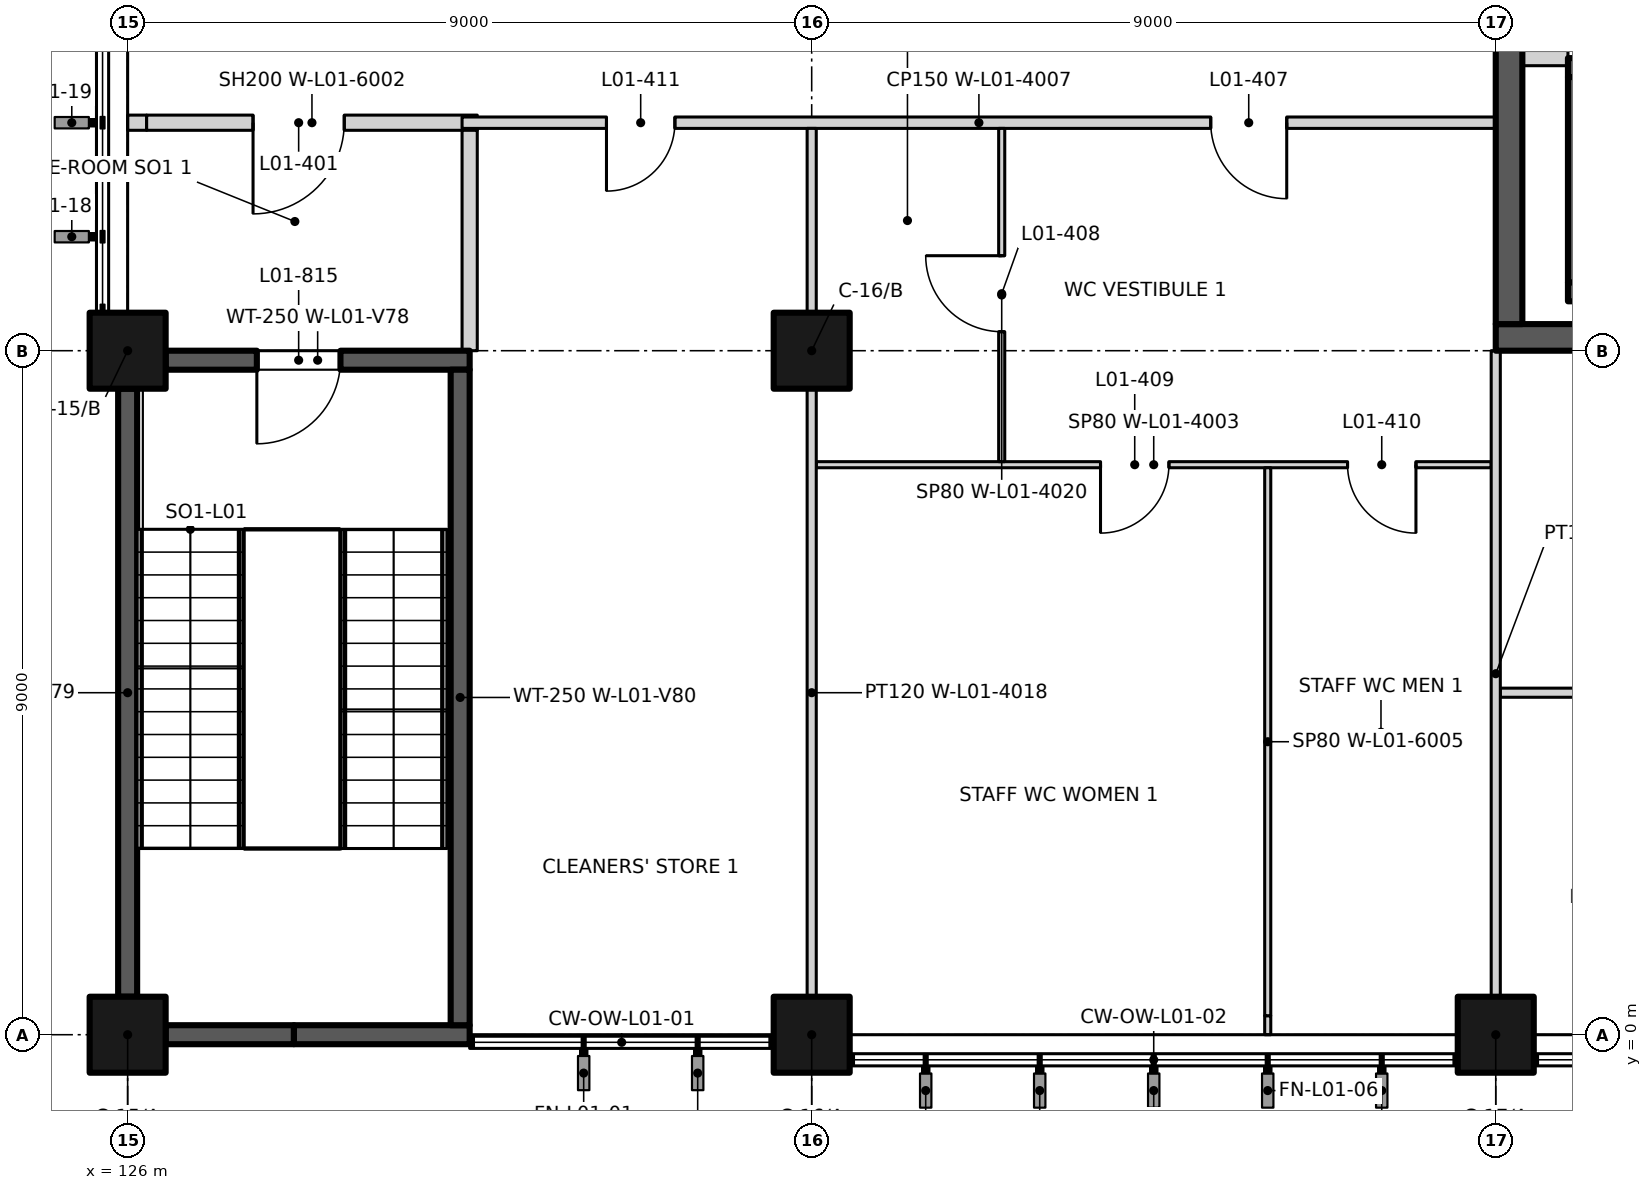
"""IFC4 building model, lengths in metres.
Left out: names, types, materials, properties, quantities, classifications, styles, units other than length and angle.
Written with IfcOpenShell. Run it as: python <this file> out.ifc"""

import sys

from ifc_helpers import new_model, si_unit, direction, frame, frame_2d, origin, origin_2d, place, context, subcontext, project, spatial, rectangle, extrude, element, fill, save


model = new_model("IFC4")
c1 = context("Model", 3, precision=1e-05, world=origin(), true_north=direction((0.0, 1.0)))
c2 = subcontext(c1, "Body", "Model", "MODEL_VIEW")
j1 = project(units=[si_unit("LENGTHUNIT", "METRE"), si_unit("PLANEANGLEUNIT", "RADIAN")], contexts=[c1])
p1 = place(None, origin())
s1 = spatial("IfcSite", under=j1, at=p1, CompositionType="ELEMENT")
p2 = place(p1, origin())
s2 = spatial("IfcBuilding", under=s1, at=p2, CompositionType="ELEMENT")
p3 = place(p2, frame((0.0, 0.0, 6.0)))
s3 = spatial("IfcBuildingStorey", under=s2, at=p3, CompositionType="ELEMENT", Elevation=6.0)
for number, where, z_axis, x_axis in (
    (1, (126.0, 0.0, 0.0), (0.0, 0.0, 1.0), (1.0, 0.0, 0.0)),
    (2, (135.0, 0.0, 0.0), (0.0, 0.0, 1.0), (1.0, 0.0, 0.0)),
    (3, (144.0, 0.0, 0.0), (0.0, 0.0, 1.0), (1.0, 0.0, 0.0)),
    (4, (126.0, 9.0, 0.0), (0.0, 0.0, 1.0), (1.0, 0.0, 0.0)),
    (5, (135.0, 9.0, 0.0), (0.0, 0.0, 1.0), (1.0, 0.0, 0.0)),
):
    element("IfcColumn", number, at=place(p3, frame(where, z_axis=z_axis, x_axis=x_axis)), inside=s3, PredefinedType="COLUMN", context=c2, shape_type="SweptSolid", body=[
        extrude(rectangle(XDim=1.0, YDim=1.0, at=origin_2d()), origin(), (0.0, 0.0, 1.0), 4.5),
    ])
p4 = place(p3, frame((126.5, 0.0, 0.0), z_axis=(0.0, 0.0, 1.0), x_axis=(1.0, 0.0, 0.0)))
e6 = element("IfcWall", 6, at=p4, inside=s3, PredefinedType="SHEAR", context=c2, shape_type="SweptSolid", body=[
    extrude(rectangle(XDim=1.688, YDim=0.25, at=frame_2d((0.844, 0.0))), origin(), (0.0, 0.0, 1.0), 4.5),
])
p5 = place(p3, frame((128.188, 0.0, 0.0), z_axis=(0.0, 0.0, 1.0), x_axis=(1.0, 0.0, 0.0)))
e7 = element("IfcWall", 7, at=p5, inside=s3, PredefinedType="SHEAR", context=c2, shape_type="SweptSolid", body=[
    extrude(rectangle(XDim=2.312, YDim=0.25, at=frame_2d((1.156, 0.0))), origin(), (0.0, 0.0, 1.0), 4.5),
])
p6 = place(p3, frame((126.5, 8.875, 0.0), z_axis=(0.0, 0.0, 1.0), x_axis=(1.0, 0.0, 0.0)))
e8 = element("IfcWall", 8, at=p6, inside=s3, PredefinedType="SHEAR", context=c2, shape_type="SweptSolid", body=[
    extrude(rectangle(XDim=4.0, YDim=0.25, at=frame_2d((2.0, 0.0))), origin(), (0.0, 0.0, 1.0), 4.5),
])
p7 = place(p6, frame((2.3, 0.0, 0.0), z_axis=(0.0, 0.0, 1.0), x_axis=(-1.0, 0.0, 0.0)))
e9 = element("IfcOpeningElement", 9, at=p7, cuts=e8, PredefinedType="OPENING", context=c2, shape_type="SweptSolid", body=[
    extrude(rectangle(XDim=1.1, YDim=2.1, at=frame_2d((0.55, 1.05))), frame((0.0, 0.135, 0.0), z_axis=(0.0, -1.0, 0.0), x_axis=(1.0, 0.0, 0.0)), (0.0, 0.0, 1.0), 0.27),
])
p8 = place(p3, frame((126.0, 0.5, 0.0), z_axis=(0.0, 0.0, 1.0), x_axis=(0.0, 1.0, 0.0)))
e10 = element("IfcWall", 10, at=p8, inside=s3, PredefinedType="SHEAR", context=c2, shape_type="SweptSolid", body=[
    extrude(rectangle(XDim=8.0, YDim=0.25, at=frame_2d((4.0, 0.0))), origin(), (0.0, 0.0, 1.0), 4.5),
])
p9 = place(p3, frame((130.375, 0.125, 0.0), z_axis=(0.0, 0.0, 1.0), x_axis=(0.0, 1.0, 0.0)))
e11 = element("IfcWall", 11, at=p9, inside=s3, PredefinedType="SHEAR", context=c2, shape_type="SweptSolid", body=[
    extrude(rectangle(XDim=8.625, YDim=0.25, at=frame_2d((4.312, 0.0))), origin(), (0.0, 0.0, 1.0), 4.5),
])
p10 = place(p3, frame((144.95, 12.725, 0.0), z_axis=(0.0, 0.0, 1.0), x_axis=(1.0, 0.0, 0.0)))
e12 = element("IfcWall", 12, at=p10, inside=s3, PredefinedType="SHEAR", context=c2, shape_type="SweptSolid", body=[
    extrude(rectangle(XDim=12.05, YDim=0.25, at=frame_2d((6.025, 0.0))), origin(), (0.0, 0.0, 1.0), 4.5),
])
p11 = place(p10, frame((1.05, 0.0, 0.0)))
e13 = element("IfcOpeningElement", 13, at=p11, cuts=e12, PredefinedType="OPENING", context=c2, shape_type="SweptSolid", body=[
    extrude(rectangle(XDim=1.1, YDim=2.1, at=frame_2d((0.55, 1.05))), frame((0.0, 0.135, 0.0), z_axis=(0.0, -1.0, 0.0), x_axis=(1.0, 0.0, 0.0)), (0.0, 0.0, 1.0), 0.27),
])
p12 = place(p10, frame((4.0, 0.0, 0.0)))
e14 = element("IfcOpeningElement", 14, at=p12, cuts=e12, PredefinedType="OPENING", context=c2, shape_type="SweptSolid", body=[
    extrude(rectangle(XDim=1.1, YDim=2.1, at=frame_2d((0.55, 1.05))), frame((0.0, 0.135, 0.0), z_axis=(0.0, -1.0, 0.0), x_axis=(1.0, 0.0, 0.0)), (0.0, 0.0, 1.0), 0.27),
])
p13 = place(p10, frame((6.95, 0.0, 0.0)))
e15 = element("IfcOpeningElement", 15, at=p13, cuts=e12, PredefinedType="OPENING", context=c2, shape_type="SweptSolid", body=[
    extrude(rectangle(XDim=1.1, YDim=2.1, at=frame_2d((0.55, 1.05))), frame((0.0, 0.135, 0.0), z_axis=(0.0, -1.0, 0.0), x_axis=(1.0, 0.0, 0.0)), (0.0, 0.0, 1.0), 0.27),
])
p14 = place(p10, frame((9.9, 0.0, 0.0)))
e16 = element("IfcOpeningElement", 16, at=p14, cuts=e12, PredefinedType="OPENING", context=c2, shape_type="SweptSolid", body=[
    extrude(rectangle(XDim=1.1, YDim=2.1, at=frame_2d((0.55, 1.05))), frame((0.0, 0.135, 0.0), z_axis=(0.0, -1.0, 0.0), x_axis=(1.0, 0.0, 0.0)), (0.0, 0.0, 1.0), 0.27),
])
p15 = place(p3, frame((144.95, 9.775, 0.0), z_axis=(0.0, 0.0, 1.0), x_axis=(1.0, 0.0, 0.0)))
e17 = element("IfcWall", 17, at=p15, inside=s3, PredefinedType="SHEAR", context=c2, shape_type="SweptSolid", body=[
    extrude(rectangle(XDim=12.05, YDim=0.25, at=frame_2d((6.025, 0.0))), origin(), (0.0, 0.0, 1.0), 4.5),
])
p16 = place(p3, frame((145.075, 9.9, 0.0), z_axis=(0.0, 0.0, 1.0), x_axis=(0.0, 1.0, 0.0)))
e18 = element("IfcWall", 18, at=p16, inside=s3, PredefinedType="SHEAR", context=c2, shape_type="SweptSolid", body=[
    extrude(rectangle(XDim=2.7, YDim=0.25, at=frame_2d((1.35, 0.0))), origin(), (0.0, 0.0, 1.0), 4.5),
])
p17 = place(p3, frame((144.06, 4.5, 0.0), z_axis=(0.0, 0.0, 1.0), x_axis=(1.0, 0.0, 0.0)))
e19 = element("IfcWall", 19, at=p17, inside=s3, PredefinedType="PARTITIONING", context=c2, shape_type="SweptSolid", body=[
    extrude(rectangle(XDim=6.0, YDim=0.12, at=frame_2d((3.0, 0.0))), origin(), (0.0, 0.0, 1.0), 4.2),
])
p18 = place(p17, frame((3.39, 0.0, 0.0), z_axis=(0.0, 0.0, 1.0), x_axis=(-1.0, 0.0, 0.0)))
e20 = element("IfcOpeningElement", 20, at=p18, cuts=e19, PredefinedType="OPENING", context=c2, shape_type="SweptSolid", body=[
    extrude(rectangle(XDim=0.9, YDim=2.1, at=frame_2d((0.45, 1.05))), frame((0.0, 0.07, 0.0), z_axis=(0.0, -1.0, 0.0), x_axis=(1.0, 0.0, 0.0)), (0.0, 0.0, 1.0), 0.14),
])
p19 = place(p3, frame((135.06, 7.5, 0.0), z_axis=(0.0, 0.0, 1.0), x_axis=(1.0, 0.0, 0.0)))
e21 = element("IfcWall", 21, at=p19, inside=s3, PredefinedType="PARTITIONING", context=c2, shape_type="SweptSolid", body=[
    extrude(rectangle(XDim=8.88, YDim=0.08, at=frame_2d((4.44, 0.0))), origin(), (0.0, 0.0, 1.0), 4.2),
])
p20 = place(p19, frame((4.64, 0.0, 0.0), z_axis=(0.0, 0.0, 1.0), x_axis=(-1.0, 0.0, 0.0)))
e22 = element("IfcOpeningElement", 22, at=p20, cuts=e21, PredefinedType="OPENING", context=c2, shape_type="SweptSolid", body=[
    extrude(rectangle(XDim=0.9, YDim=2.1, at=frame_2d((0.45, 1.05))), frame((0.0, 0.05, 0.0), z_axis=(0.0, -1.0, 0.0), x_axis=(1.0, 0.0, 0.0)), (0.0, 0.0, 1.0), 0.1),
])
p21 = place(p19, frame((7.89, 0.0, 0.0), z_axis=(0.0, 0.0, 1.0), x_axis=(-1.0, 0.0, 0.0)))
e23 = element("IfcOpeningElement", 23, at=p21, cuts=e21, PredefinedType="OPENING", context=c2, shape_type="SweptSolid", body=[
    extrude(rectangle(XDim=0.9, YDim=2.1, at=frame_2d((0.45, 1.05))), frame((0.0, 0.05, 0.0), z_axis=(0.0, -1.0, 0.0), x_axis=(1.0, 0.0, 0.0)), (0.0, 0.0, 1.0), 0.1),
])
p22 = place(p3, frame((144.0, 9.175, 0.0), z_axis=(0.0, 0.0, 1.0), x_axis=(1.0, 0.0, 0.0)))
e24 = element("IfcWall", 24, at=p22, inside=s3, PredefinedType="SHEAR", context=c2, shape_type="SweptSolid", body=[
    extrude(rectangle(XDim=18.0, YDim=0.35, at=frame_2d((9.0, 0.0))), origin(), (0.0, 0.0, 1.0), 4.2),
])
p23 = place(p22, frame((16.463, 0.0, 0.0), z_axis=(0.0, 0.0, 1.0), x_axis=(-1.0, 0.0, 0.0)))
e25 = element("IfcOpeningElement", 25, at=p23, cuts=e24, PredefinedType="OPENING", context=c2, shape_type="SweptSolid", body=[
    extrude(rectangle(XDim=2.1, YDim=2.4, at=frame_2d((1.05, 1.2))), frame((0.0, 0.185, 0.0), z_axis=(0.0, -1.0, 0.0), x_axis=(1.0, 0.0, 0.0)), (0.0, 0.0, 1.0), 0.37),
])
p24 = place(p3, frame((126.0, 12.0, 0.0), z_axis=(0.0, 0.0, 1.0), x_axis=(1.0, 0.0, 0.0)))
e26 = element("IfcWall", 26, at=p24, inside=s3, PredefinedType="PARTITIONING", context=c2, shape_type="SweptSolid", body=[
    extrude(rectangle(XDim=0.25, YDim=0.2, at=frame_2d((0.125, 0.0))), origin(), (0.0, 0.0, 1.0), 3.6),
])
p25 = place(p3, frame((126.25, 12.0, 0.0), z_axis=(0.0, 0.0, 1.0), x_axis=(1.0, 0.0, 0.0)))
e27 = element("IfcWall", 27, at=p25, inside=s3, PredefinedType="PARTITIONING", context=c2, shape_type="SweptSolid", body=[
    extrude(rectangle(XDim=4.35, YDim=0.2, at=frame_2d((2.175, 0.0))), origin(), (0.0, 0.0, 1.0), 4.2),
])
p26 = place(p25, frame((2.6, 0.0, 0.0), z_axis=(0.0, 0.0, 1.0), x_axis=(-1.0, 0.0, 0.0)))
e28 = element("IfcOpeningElement", 28, at=p26, cuts=e27, PredefinedType="OPENING", context=c2, shape_type="SweptSolid", body=[
    extrude(rectangle(XDim=1.2, YDim=2.1, at=frame_2d((0.6, 1.05))), frame((0.0, 0.11, 0.0), z_axis=(0.0, -1.0, 0.0), x_axis=(1.0, 0.0, 0.0)), (0.0, 0.0, 1.0), 0.22),
])
p27 = place(p3, frame((130.4, 12.0, 0.0), z_axis=(0.0, 0.0, 1.0), x_axis=(1.0, 0.0, 0.0)))
e29 = element("IfcWall", 29, at=p27, inside=s3, PredefinedType="PARTITIONING", context=c2, shape_type="SweptSolid", body=[
    extrude(rectangle(XDim=13.6, YDim=0.15, at=frame_2d((6.8, 0.0))), origin(), (0.0, 0.0, 1.0), 4.2),
])
p28 = place(p27, frame((10.85, 0.0, 0.0), z_axis=(0.0, 0.0, 1.0), x_axis=(-1.0, 0.0, 0.0)))
e30 = element("IfcOpeningElement", 30, at=p28, cuts=e29, PredefinedType="OPENING", context=c2, shape_type="SweptSolid", body=[
    extrude(rectangle(XDim=1.0, YDim=2.1, at=frame_2d((0.5, 1.05))), frame((0.0, 0.085, 0.0), z_axis=(0.0, -1.0, 0.0), x_axis=(1.0, 0.0, 0.0)), (0.0, 0.0, 1.0), 0.17),
])
p29 = place(p27, frame((2.8, 0.0, 0.0), z_axis=(0.0, 0.0, 1.0), x_axis=(-1.0, 0.0, 0.0)))
e31 = element("IfcOpeningElement", 31, at=p29, cuts=e29, PredefinedType="OPENING", context=c2, shape_type="SweptSolid", body=[
    extrude(rectangle(XDim=0.9, YDim=2.1, at=frame_2d((0.45, 1.05))), frame((0.0, 0.085, 0.0), z_axis=(0.0, -1.0, 0.0), x_axis=(1.0, 0.0, 0.0)), (0.0, 0.0, 1.0), 0.17),
])
p30 = place(p3, frame((144.35, 12.85, 0.0), z_axis=(0.0, 0.0, 1.0), x_axis=(1.0, 0.0, 0.0)))
e32 = element("IfcWall", 32, at=p30, inside=s3, PredefinedType="PARTITIONING", context=c2, shape_type="SweptSolid", body=[
    extrude(rectangle(XDim=0.6, YDim=0.2, at=frame_2d((0.3, 0.0))), origin(), (0.0, 0.0, 1.0), 4.2),
])
p31 = place(p3, frame((130.5, 9.0, 0.0), z_axis=(0.0, 0.0, 1.0), x_axis=(0.0, 1.0, 0.0)))
e33 = element("IfcWall", 33, at=p31, inside=s3, PredefinedType="PARTITIONING", context=c2, shape_type="SweptSolid", body=[
    extrude(rectangle(XDim=2.9, YDim=0.2, at=frame_2d((1.45, 0.0))), origin(), (0.0, 0.0, 1.0), 4.2),
])
p32 = place(p3, frame((135.0, 0.5, 0.0), z_axis=(0.0, 0.0, 1.0), x_axis=(0.0, 1.0, 0.0)))
e34 = element("IfcWall", 34, at=p32, inside=s3, PredefinedType="PARTITIONING", context=c2, shape_type="SweptSolid", body=[
    extrude(rectangle(XDim=8.0, YDim=0.12, at=frame_2d((4.0, 0.0))), origin(), (0.0, 0.0, 1.0), 4.2),
])
p33 = place(p3, frame((135.0, 9.5, 0.0), z_axis=(0.0, 0.0, 1.0), x_axis=(0.0, 1.0, 0.0)))
e35 = element("IfcWall", 35, at=p33, inside=s3, PredefinedType="PARTITIONING", context=c2, shape_type="SweptSolid", body=[
    extrude(rectangle(XDim=2.425, YDim=0.12, at=frame_2d((1.212, 0.0))), origin(), (0.0, 0.0, 1.0), 4.2),
])
p34 = place(p3, frame((137.5, 7.54, 0.0), z_axis=(0.0, 0.0, 1.0), x_axis=(0.0, 1.0, 0.0)))
e36 = element("IfcWall", 36, at=p34, inside=s3, PredefinedType="PARTITIONING", context=c2, shape_type="SweptSolid", body=[
    extrude(rectangle(XDim=4.385, YDim=0.08, at=frame_2d((2.192, 0.0))), origin(), (0.0, 0.0, 1.0), 4.2),
])
p35 = place(p34, frame((1.71, 0.0, 0.0)))
e37 = element("IfcOpeningElement", 37, at=p35, cuts=e36, PredefinedType="OPENING", context=c2, shape_type="SweptSolid", body=[
    extrude(rectangle(XDim=1.0, YDim=2.1, at=frame_2d((0.5, 1.05))), frame((0.0, 0.05, 0.0), z_axis=(0.0, -1.0, 0.0), x_axis=(1.0, 0.0, 0.0)), (0.0, 0.0, 1.0), 0.1),
])
p36 = place(p3, frame((141.0, 0.0, 0.0), z_axis=(0.0, 0.0, 1.0), x_axis=(0.0, 1.0, 0.0)))
e38 = element("IfcWall", 38, at=p36, inside=s3, PredefinedType="PARTITIONING", context=c2, shape_type="SweptSolid", body=[
    extrude(rectangle(XDim=0.25, YDim=0.08, at=frame_2d((0.125, 0.0))), origin(), (0.0, 0.0, 1.0), 3.6),
])
p37 = place(p3, frame((141.0, 0.25, 0.0), z_axis=(0.0, 0.0, 1.0), x_axis=(0.0, 1.0, 0.0)))
e39 = element("IfcWall", 39, at=p37, inside=s3, PredefinedType="PARTITIONING", context=c2, shape_type="SweptSolid", body=[
    extrude(rectangle(XDim=7.21, YDim=0.08, at=frame_2d((3.605, 0.0))), origin(), (0.0, 0.0, 1.0), 4.2),
])
p38 = place(p3, frame((144.0, 0.5, 0.0), z_axis=(0.0, 0.0, 1.0), x_axis=(0.0, 1.0, 0.0)))
e40 = element("IfcWall", 40, at=p38, inside=s3, PredefinedType="PARTITIONING", context=c2, shape_type="SweptSolid", body=[
    extrude(rectangle(XDim=8.5, YDim=0.12, at=frame_2d((4.25, 0.0))), origin(), (0.0, 0.0, 1.0), 4.2),
])
p39 = place(p3, frame((144.175, 9.35, 0.0), z_axis=(0.0, 0.0, 1.0), x_axis=(0.0, 1.0, 0.0)))
e41 = element("IfcWall", 41, at=p39, inside=s3, PredefinedType="SHEAR", context=c2, shape_type="SweptSolid", body=[
    extrude(rectangle(XDim=17.4, YDim=0.35, at=frame_2d((8.7, 0.0))), origin(), (0.0, 0.0, 1.0), 4.2),
])
p40 = place(p39, frame((3.75, 0.0, 0.0)))
e42 = element("IfcOpeningElement", 42, at=p40, cuts=e41, PredefinedType="OPENING", context=c2, shape_type="SweptSolid", body=[
    extrude(rectangle(XDim=1.6, YDim=2.4, at=frame_2d((0.8, 1.2))), frame((0.0, 0.185, 0.0), z_axis=(0.0, -1.0, 0.0), x_axis=(1.0, 0.0, 0.0)), (0.0, 0.0, 1.0), 0.37),
])
p41 = place(p7, origin())
e43 = element("IfcDoor", 43, at=p41, inside=s3, OperationType="SINGLE_SWING_RIGHT", PredefinedType="DOOR", context=c2, shape_type="SweptSolid", body=[
    extrude(rectangle(XDim=1.1, YDim=2.1, at=frame_2d((0.55, 1.05))), frame((0.0, 0.025, 0.0), z_axis=(0.0, -1.0, 0.0), x_axis=(1.0, 0.0, 0.0)), (0.0, 0.0, 1.0), 0.05),
])
fill(e9, e43)
p42 = place(p26, origin())
e44 = element("IfcDoor", 44, at=p42, inside=s3, OperationType="SINGLE_SWING_RIGHT", PredefinedType="DOOR", context=c2, shape_type="SweptSolid", body=[
    extrude(rectangle(XDim=1.2, YDim=2.1, at=frame_2d((0.6, 1.05))), frame((0.0, 0.025, 0.0), z_axis=(0.0, -1.0, 0.0), x_axis=(1.0, 0.0, 0.0)), (0.0, 0.0, 1.0), 0.05),
])
fill(e28, e44)
p43 = place(p28, origin())
e45 = element("IfcDoor", 45, at=p43, inside=s3, OperationType="SINGLE_SWING_LEFT", PredefinedType="DOOR", context=c2, shape_type="SweptSolid", body=[
    extrude(rectangle(XDim=1.0, YDim=2.1, at=frame_2d((0.5, 1.05))), frame((0.0, 0.025, 0.0), z_axis=(0.0, -1.0, 0.0), x_axis=(1.0, 0.0, 0.0)), (0.0, 0.0, 1.0), 0.05),
])
fill(e30, e45)
p44 = place(p35, origin())
e46 = element("IfcDoor", 46, at=p44, inside=s3, OperationType="SINGLE_SWING_RIGHT", PredefinedType="DOOR", context=c2, shape_type="SweptSolid", body=[
    extrude(rectangle(XDim=1.0, YDim=2.1, at=frame_2d((0.5, 1.05))), frame((0.0, 0.025, 0.0), z_axis=(0.0, -1.0, 0.0), x_axis=(1.0, 0.0, 0.0)), (0.0, 0.0, 1.0), 0.05),
])
fill(e37, e46)
p45 = place(p20, origin())
e47 = element("IfcDoor", 47, at=p45, inside=s3, OperationType="SINGLE_SWING_RIGHT", PredefinedType="DOOR", context=c2, shape_type="SweptSolid", body=[
    extrude(rectangle(XDim=0.9, YDim=2.1, at=frame_2d((0.45, 1.05))), frame((0.0, 0.025, 0.0), z_axis=(0.0, -1.0, 0.0), x_axis=(1.0, 0.0, 0.0)), (0.0, 0.0, 1.0), 0.05),
])
fill(e22, e47)
p46 = place(p21, origin())
e48 = element("IfcDoor", 48, at=p46, inside=s3, OperationType="SINGLE_SWING_LEFT", PredefinedType="DOOR", context=c2, shape_type="SweptSolid", body=[
    extrude(rectangle(XDim=0.9, YDim=2.1, at=frame_2d((0.45, 1.05))), frame((0.0, 0.025, 0.0), z_axis=(0.0, -1.0, 0.0), x_axis=(1.0, 0.0, 0.0)), (0.0, 0.0, 1.0), 0.05),
])
fill(e23, e48)
p47 = place(p29, origin())
e49 = element("IfcDoor", 49, at=p47, inside=s3, OperationType="SINGLE_SWING_RIGHT", PredefinedType="DOOR", context=c2, shape_type="SweptSolid", body=[
    extrude(rectangle(XDim=0.9, YDim=2.1, at=frame_2d((0.45, 1.05))), frame((0.0, 0.025, 0.0), z_axis=(0.0, -1.0, 0.0), x_axis=(1.0, 0.0, 0.0)), (0.0, 0.0, 1.0), 0.05),
])
fill(e31, e49)
save(model, sys.argv[1])
